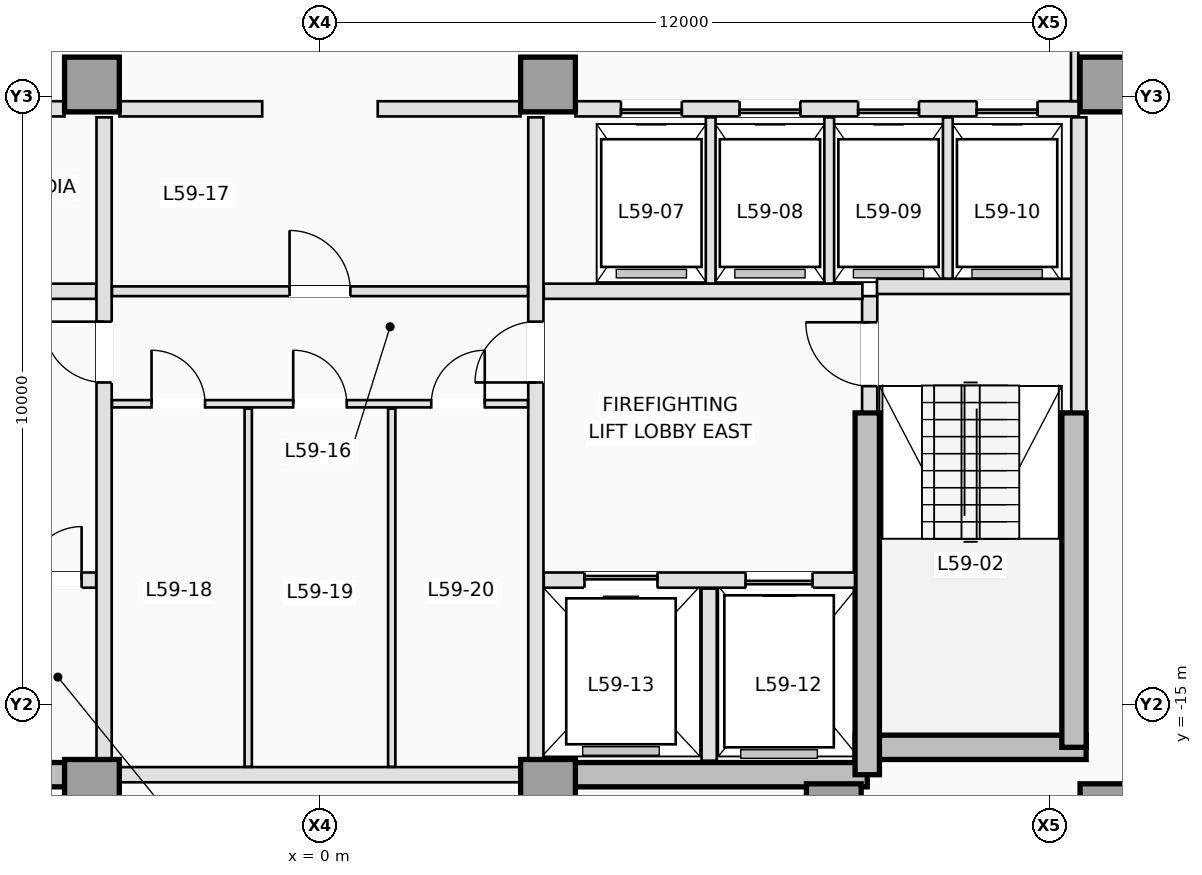
"""IFC4 building model, lengths in metres.
Left out: names, types, materials, properties, quantities, classifications, styles, units other than length and angle.
Written with IfcOpenShell. Run it as: python <this file> out.ifc"""

import sys

from ifc_helpers import new_model, si_unit, direction, frame, frame_2d, origin, origin_2d, place, context, subcontext, project, spatial, rectangle, extrude, element, fill, save


model = new_model("IFC4")
c1 = context("Model", 3, precision=1e-05, world=origin(), true_north=direction((0.0, 1.0)))
c2 = subcontext(c1, "Body", "Model", "MODEL_VIEW")
j1 = project(units=[si_unit("LENGTHUNIT", "METRE"), si_unit("PLANEANGLEUNIT", "RADIAN")], contexts=[c1])
p1 = place(None, origin())
s1 = spatial("IfcSite", under=j1, at=p1, CompositionType="ELEMENT")
p2 = place(p1, origin())
s2 = spatial("IfcBuilding", under=s1, at=p2, CompositionType="ELEMENT")
p3 = place(p2, frame((0.0, 0.0, 214.9)))
s3 = spatial("IfcBuildingStorey", under=s2, at=p3, CompositionType="ELEMENT", Elevation=214.9)
for number, where, z_axis, x_axis in (
    (1, (-9.0, -16.15, 0.0), (0.0, 0.0, 1.0), (1.0, 0.0, 0.0)),
    (2, (3.75, -16.15, 0.0), (0.0, 0.0, 1.0), (1.0, 0.0, 0.0)),
):
    element("IfcWall", number, at=place(p3, frame(where, z_axis=z_axis, x_axis=x_axis)), inside=s3, PredefinedType="SHEAR", context=c2, shape_type="SweptSolid", body=[
        extrude(rectangle(XDim=5.25, YDim=0.4, at=frame_2d((2.625, 0.0))), origin(), (0.0, 0.0, 1.0), 3.5),
    ])
p4 = place(p3, frame((8.8, -15.7, 0.0), z_axis=(0.0, 0.0, 1.0), x_axis=(1.0, 0.0, 0.0)))
e3 = element("IfcWall", 3, at=p4, inside=s3, PredefinedType="SHEAR", context=c2, shape_type="SweptSolid", body=[
    extrude(rectangle(XDim=3.8, YDim=0.4, at=frame_2d((1.9, 0.0))), origin(), (0.0, 0.0, 1.0), 3.5),
])
p5 = place(p3, frame((12.4, -15.7, 0.0), z_axis=(0.0, 0.0, 1.0), x_axis=(0.0, 1.0, 0.0)))
e4 = element("IfcWall", 4, at=p5, inside=s3, PredefinedType="SHEAR", context=c2, shape_type="SweptSolid", body=[
    extrude(rectangle(XDim=5.5, YDim=0.4, at=frame_2d((2.75, 0.0))), origin(), (0.0, 0.0, 1.0), 3.5),
])
p6 = place(p3, frame((9.0, -16.15, 0.0), z_axis=(0.0, 0.0, 1.0), x_axis=(0.0, 1.0, 0.0)))
e5 = element("IfcWall", 5, at=p6, inside=s3, PredefinedType="SHEAR", context=c2, shape_type="SweptSolid", body=[
    extrude(rectangle(XDim=5.95, YDim=0.4, at=frame_2d((2.975, 0.0))), origin(), (0.0, 0.0, 1.0), 3.5),
])
for number, where, z_axis, x_axis in (
    (6, (-3.75, -16.35, 0.0), (0.0, 0.0, 1.0), (1.0, 0.0, 0.0)),
    (7, (3.75, -16.35, 0.0), (0.0, 0.0, 1.0), (1.0, 0.0, 0.0)),
    (8, (8.45, -16.75, 0.0), (0.0, 0.0, 1.0), (1.0, 0.0, 0.0)),
    (9, (12.95, -16.75, 0.0), (0.0, 0.0, 1.0), (1.0, 0.0, 0.0)),
    (10, (-3.75, -4.8, 0.0), (0.0, 0.0, 1.0), (1.0, 0.0, 0.0)),
    (11, (3.75, -4.8, 0.0), (0.0, 0.0, 1.0), (1.0, 0.0, 0.0)),
    (12, (12.95, -4.8, 0.0), (0.0, 0.0, 1.0), (1.0, 0.0, 0.0)),
):
    element("IfcColumn", number, at=place(p3, frame(where, z_axis=z_axis, x_axis=x_axis)), inside=s3, PredefinedType="COLUMN", context=c2, shape_type="SweptSolid", body=[
        extrude(rectangle(XDim=0.9, YDim=0.9, at=origin_2d()), origin(), (0.0, 0.0, 1.0), 3.5),
    ])
p7 = place(p3, frame((9.04, -10.18, 0.0), z_axis=(0.0, 0.0, 1.0), x_axis=(0.0, 1.0, 0.0)))
e13 = element("IfcWall", 13, at=p7, inside=s3, PredefinedType="PARTITIONING", context=c2, shape_type="SweptSolid", body=[
    extrude(rectangle(XDim=1.9, YDim=0.25, at=frame_2d((0.95, 0.0))), origin(), (0.0, 0.0, 1.0), 3.25),
])
p8 = place(p7, frame((0.42, 0.0, 0.0)))
e14 = element("IfcOpeningElement", 14, at=p8, cuts=e13, PredefinedType="OPENING", context=c2, shape_type="SweptSolid", body=[
    extrude(rectangle(XDim=1.05, YDim=2.15, at=frame_2d((0.525, 1.075))), frame((0.0, 0.135, 0.0), z_axis=(0.0, -1.0, 0.0), x_axis=(1.0, 0.0, 0.0)), (0.0, 0.0, 1.0), 0.27),
])
p9 = place(p3, frame((9.16, -8.12, 0.0), z_axis=(0.0, 0.0, 1.0), x_axis=(1.0, 0.0, 0.0)))
e15 = element("IfcWall", 15, at=p9, inside=s3, PredefinedType="PARTITIONING", context=c2, shape_type="SweptSolid", body=[
    extrude(rectangle(XDim=3.22, YDim=0.25, at=frame_2d((1.61, 0.0))), origin(), (0.0, 0.0, 1.0), 3.25),
])
p10 = place(p3, frame((12.48, -10.18, 0.0), z_axis=(0.0, 0.0, 1.0), x_axis=(0.0, 1.0, 0.0)))
e16 = element("IfcWall", 16, at=p10, inside=s3, PredefinedType="PARTITIONING", context=c2, shape_type="SweptSolid", body=[
    extrude(rectangle(XDim=4.84, YDim=0.25, at=frame_2d((2.42, 0.0))), origin(), (0.0, 0.0, 1.0), 3.25),
])
p11 = place(p3, frame((-8.798, -12.95, 0.0), z_axis=(0.0, 0.0, 1.0), x_axis=(1.0, 0.0, 0.0)))
e17 = element("IfcWall", 17, at=p11, inside=s3, PredefinedType="PARTITIONING", context=c2, shape_type="SweptSolid", body=[
    extrude(rectangle(XDim=5.118, YDim=0.25, at=frame_2d((2.559, 0.0))), origin(), (0.0, 0.0, 1.0), 3.25),
])
p12 = place(p11, frame((0.698, 0.0, 0.0)))
e18 = element("IfcOpeningElement", 18, at=p12, cuts=e17, PredefinedType="OPENING", context=c2, shape_type="SweptSolid", body=[
    extrude(rectangle(XDim=1.1, YDim=2.15, at=frame_2d((0.55, 1.075))), frame((0.0, 0.135, 0.0), z_axis=(0.0, -1.0, 0.0), x_axis=(1.0, 0.0, 0.0)), (0.0, 0.0, 1.0), 0.27),
])
p13 = place(p11, frame((2.598, 0.0, 0.0)))
e19 = element("IfcOpeningElement", 19, at=p13, cuts=e17, PredefinedType="OPENING", context=c2, shape_type="SweptSolid", body=[
    extrude(rectangle(XDim=0.88, YDim=2.1, at=frame_2d((0.44, 1.05))), frame((0.0, 0.135, 0.0), z_axis=(0.0, -1.0, 0.0), x_axis=(1.0, 0.0, 0.0)), (0.0, 0.0, 1.0), 0.27),
])
p14 = place(p11, frame((3.998, 0.0, 0.0)))
e20 = element("IfcOpeningElement", 20, at=p14, cuts=e17, PredefinedType="OPENING", context=c2, shape_type="SweptSolid", body=[
    extrude(rectangle(XDim=0.88, YDim=2.1, at=frame_2d((0.44, 1.05))), frame((0.0, 0.135, 0.0), z_axis=(0.0, -1.0, 0.0), x_axis=(1.0, 0.0, 0.0)), (0.0, 0.0, 1.0), 0.27),
])
p15 = place(p3, frame((3.68, -12.95, 0.0), z_axis=(0.0, 0.0, 1.0), x_axis=(1.0, 0.0, 0.0)))
e21 = element("IfcWall", 21, at=p15, inside=s3, PredefinedType="PARTITIONING", context=c2, shape_type="SweptSolid", body=[
    extrude(rectangle(XDim=5.118, YDim=0.25, at=frame_2d((2.559, 0.0))), origin(), (0.0, 0.0, 1.0), 3.25),
])
p16 = place(p15, frame((3.32, 0.0, 0.0)))
e22 = element("IfcOpeningElement", 22, at=p16, cuts=e21, PredefinedType="OPENING", context=c2, shape_type="SweptSolid", body=[
    extrude(rectangle(XDim=1.1, YDim=2.15, at=frame_2d((0.55, 1.075))), frame((0.0, 0.135, 0.0), z_axis=(0.0, -1.0, 0.0), x_axis=(1.0, 0.0, 0.0)), (0.0, 0.0, 1.0), 0.27),
])
p17 = place(p15, frame((0.67, 0.0, 0.0)))
e23 = element("IfcOpeningElement", 23, at=p17, cuts=e21, PredefinedType="OPENING", context=c2, shape_type="SweptSolid", body=[
    extrude(rectangle(XDim=1.2, YDim=2.15, at=frame_2d((0.6, 1.075))), frame((0.0, 0.135, 0.0), z_axis=(0.0, -1.0, 0.0), x_axis=(1.0, 0.0, 0.0)), (0.0, 0.0, 1.0), 0.27),
])
p18 = place(p3, frame((6.4, -15.92, 0.0), z_axis=(0.0, 0.0, 1.0), x_axis=(0.0, 1.0, 0.0)))
e24 = element("IfcWall", 24, at=p18, inside=s3, PredefinedType="PARTITIONING", context=c2, shape_type="SweptSolid", body=[
    extrude(rectangle(XDim=2.83, YDim=0.25, at=frame_2d((1.415, 0.0))), origin(), (0.0, 0.0, 1.0), 3.25),
])
for number, where, z_axis, x_axis in (
    (25, (-8.92, -8.2, 0.0), (0.0, 0.0, 1.0), (1.0, 0.0, 0.0)),
    (26, (3.68, -8.2, 0.0), (0.0, 0.0, 1.0), (1.0, 0.0, 0.0)),
):
    element("IfcWall", number, at=place(p3, frame(where, z_axis=z_axis, x_axis=x_axis)), inside=s3, PredefinedType="PARTITIONING", context=c2, shape_type="SweptSolid", body=[
        extrude(rectangle(XDim=5.24, YDim=0.25, at=frame_2d((2.62, 0.0))), origin(), (0.0, 0.0, 1.0), 3.25),
    ])
p19 = place(p3, frame((-3.55, -15.898, 0.0), z_axis=(0.0, 0.0, 1.0), x_axis=(0.0, 1.0, 0.0)))
e27 = element("IfcWall", 27, at=p19, inside=s3, PredefinedType="PARTITIONING", context=c2, shape_type="SweptSolid", body=[
    extrude(rectangle(XDim=10.558, YDim=0.25, at=frame_2d((5.279, 0.0))), origin(), (0.0, 0.0, 1.0), 3.25),
])
p20 = place(p19, frame((6.198, 0.0, 0.0)))
e28 = element("IfcOpeningElement", 28, at=p20, cuts=e27, PredefinedType="OPENING", context=c2, shape_type="SweptSolid", body=[
    extrude(rectangle(XDim=1.0, YDim=2.15, at=frame_2d((0.5, 1.075))), frame((0.0, 0.135, 0.0), z_axis=(0.0, -1.0, 0.0), x_axis=(1.0, 0.0, 0.0)), (0.0, 0.0, 1.0), 0.27),
])
p21 = place(p3, frame((3.55, -15.898, 0.0), z_axis=(0.0, 0.0, 1.0), x_axis=(0.0, 1.0, 0.0)))
e29 = element("IfcWall", 29, at=p21, inside=s3, PredefinedType="PARTITIONING", context=c2, shape_type="SweptSolid", body=[
    extrude(rectangle(XDim=10.558, YDim=0.25, at=frame_2d((5.279, 0.0))), origin(), (0.0, 0.0, 1.0), 3.25),
])
p22 = place(p21, frame((6.198, 0.0, 0.0)))
e30 = element("IfcOpeningElement", 30, at=p22, cuts=e29, PredefinedType="OPENING", context=c2, shape_type="SweptSolid", body=[
    extrude(rectangle(XDim=1.0, YDim=2.15, at=frame_2d((0.5, 1.075))), frame((0.0, 0.135, 0.0), z_axis=(0.0, -1.0, 0.0), x_axis=(1.0, 0.0, 0.0)), (0.0, 0.0, 1.0), 0.27),
])
p23 = place(p3, frame((-12.48, -5.2, 0.0), z_axis=(0.0, 0.0, 1.0), x_axis=(1.0, 0.0, 0.0)))
e31 = element("IfcWall", 31, at=p23, inside=s3, PredefinedType="PARTITIONING", context=c2, shape_type="SweptSolid", body=[
    extrude(rectangle(XDim=8.278, YDim=0.25, at=frame_2d((4.139, 0.0))), origin(), (0.0, 0.0, 1.0), 3.25),
])
p24 = place(p23, frame((3.05, 0.0, 0.0)))
e32 = element("IfcOpeningElement", 32, at=p24, cuts=e31, PredefinedType="OPENING", context=c2, shape_type="SweptSolid", body=[
    extrude(rectangle(XDim=0.92, YDim=2.12, at=frame_2d((0.46, 1.06))), frame((0.0, 0.135, 0.0), z_axis=(0.0, -1.0, 0.0), x_axis=(1.0, 0.0, 0.0)), (0.0, 0.0, 1.0), 0.27),
])
p25 = place(p23, frame((6.15, 0.0, 0.0)))
e33 = element("IfcOpeningElement", 33, at=p25, cuts=e31, PredefinedType="OPENING", context=c2, shape_type="SweptSolid", body=[
    extrude(rectangle(XDim=0.92, YDim=2.12, at=frame_2d((0.46, 1.06))), frame((0.0, 0.135, 0.0), z_axis=(0.0, -1.0, 0.0), x_axis=(1.0, 0.0, 0.0)), (0.0, 0.0, 1.0), 0.27),
])
p26 = place(p3, frame((4.202, -5.2, 0.0), z_axis=(0.0, 0.0, 1.0), x_axis=(1.0, 0.0, 0.0)))
e34 = element("IfcWall", 34, at=p26, inside=s3, PredefinedType="PARTITIONING", context=c2, shape_type="SweptSolid", body=[
    extrude(rectangle(XDim=8.278, YDim=0.25, at=frame_2d((4.139, 0.0))), origin(), (0.0, 0.0, 1.0), 3.25),
])
p27 = place(p26, frame((0.748, 0.0, 0.0)))
e35 = element("IfcOpeningElement", 35, at=p27, cuts=e34, PredefinedType="OPENING", context=c2, shape_type="SweptSolid", body=[
    extrude(rectangle(XDim=1.0, YDim=2.15, at=frame_2d((0.5, 1.075))), frame((0.0, 0.135, 0.0), z_axis=(0.0, -1.0, 0.0), x_axis=(1.0, 0.0, 0.0)), (0.0, 0.0, 1.0), 0.27),
])
p28 = place(p26, frame((2.698, 0.0, 0.0)))
e36 = element("IfcOpeningElement", 36, at=p28, cuts=e34, PredefinedType="OPENING", context=c2, shape_type="SweptSolid", body=[
    extrude(rectangle(XDim=1.0, YDim=2.15, at=frame_2d((0.5, 1.075))), frame((0.0, 0.135, 0.0), z_axis=(0.0, -1.0, 0.0), x_axis=(1.0, 0.0, 0.0)), (0.0, 0.0, 1.0), 0.27),
])
p29 = place(p26, frame((4.648, 0.0, 0.0)))
e37 = element("IfcOpeningElement", 37, at=p29, cuts=e34, PredefinedType="OPENING", context=c2, shape_type="SweptSolid", body=[
    extrude(rectangle(XDim=1.0, YDim=2.15, at=frame_2d((0.5, 1.075))), frame((0.0, 0.135, 0.0), z_axis=(0.0, -1.0, 0.0), x_axis=(1.0, 0.0, 0.0)), (0.0, 0.0, 1.0), 0.27),
])
p30 = place(p26, frame((6.598, 0.0, 0.0)))
e38 = element("IfcOpeningElement", 38, at=p30, cuts=e34, PredefinedType="OPENING", context=c2, shape_type="SweptSolid", body=[
    extrude(rectangle(XDim=1.0, YDim=2.15, at=frame_2d((0.5, 1.075))), frame((0.0, 0.135, 0.0), z_axis=(0.0, -1.0, 0.0), x_axis=(1.0, 0.0, 0.0)), (0.0, 0.0, 1.0), 0.27),
])
for number, where, z_axis, x_axis in (
    (39, (-3.298, -5.2, 0.0), (0.0, 0.0, 1.0), (1.0, 0.0, 0.0)),
    (40, (0.95, -5.2, 0.0), (0.0, 0.0, 1.0), (1.0, 0.0, 0.0)),
):
    element("IfcWall", number, at=place(p3, frame(where, z_axis=z_axis, x_axis=x_axis)), inside=s3, PredefinedType="PARTITIONING", context=c2, shape_type="SweptSolid", body=[
        extrude(rectangle(XDim=2.348, YDim=0.25, at=frame_2d((1.174, 0.0))), origin(), (0.0, 0.0, 1.0), 3.25),
    ])
for number, where, z_axis, x_axis in (
    (41, (6.425, -8.073, 0.0), (0.0, 0.0, 1.0), (0.0, 1.0, 0.0)),
    (42, (8.375, -8.073, 0.0), (0.0, 0.0, 1.0), (0.0, 1.0, 0.0)),
):
    element("IfcWall", number, at=place(p3, frame(where, z_axis=z_axis, x_axis=x_axis)), inside=s3, PredefinedType="PARTITIONING", context=c2, shape_type="SweptSolid", body=[
        extrude(rectangle(XDim=2.733, YDim=0.16, at=frame_2d((1.366, 0.0))), origin(), (0.0, 0.0, 1.0), 3.25),
    ])
p31 = place(p3, frame((10.325, -7.993, 0.0), z_axis=(0.0, 0.0, 1.0), x_axis=(0.0, 1.0, 0.0)))
e43 = element("IfcWall", 43, at=p31, inside=s3, PredefinedType="PARTITIONING", context=c2, shape_type="SweptSolid", body=[
    extrude(rectangle(XDim=2.653, YDim=0.16, at=frame_2d((1.326, 0.0))), origin(), (0.0, 0.0, 1.0), 3.25),
])
p32 = place(p3, frame((-3.298, -16.15, 0.0), z_axis=(0.0, 0.0, 1.0), x_axis=(1.0, 0.0, 0.0)))
e44 = element("IfcWall", 44, at=p32, inside=s3, PredefinedType="PARTITIONING", context=c2, shape_type="SweptSolid", body=[
    extrude(rectangle(XDim=6.596, YDim=0.25, at=frame_2d((3.298, 0.0))), origin(), (0.0, 0.0, 1.0), 2.45),
])
p33 = place(p3, frame((-3.42, -8.2, 0.0), z_axis=(0.0, 0.0, 1.0), x_axis=(1.0, 0.0, 0.0)))
e45 = element("IfcWall", 45, at=p33, inside=s3, PredefinedType="PARTITIONING", context=c2, shape_type="SweptSolid", body=[
    extrude(rectangle(XDim=6.84, YDim=0.16, at=frame_2d((3.42, 0.0))), origin(), (0.0, 0.0, 1.0), 3.25),
])
p34 = place(p33, frame((2.92, 0.0, 0.0)))
e46 = element("IfcOpeningElement", 46, at=p34, cuts=e45, PredefinedType="OPENING", context=c2, shape_type="SweptSolid", body=[
    extrude(rectangle(XDim=1.0, YDim=2.15, at=frame_2d((0.5, 1.075))), frame((0.0, 0.09, 0.0), z_axis=(0.0, -1.0, 0.0), x_axis=(1.0, 0.0, 0.0)), (0.0, 0.0, 1.0), 0.18),
])
p35 = place(p3, frame((-3.42, -10.05, 0.0), z_axis=(0.0, 0.0, 1.0), x_axis=(1.0, 0.0, 0.0)))
e47 = element("IfcWall", 47, at=p35, inside=s3, PredefinedType="PARTITIONING", context=c2, shape_type="SweptSolid", body=[
    extrude(rectangle(XDim=6.84, YDim=0.12, at=frame_2d((3.42, 0.0))), origin(), (0.0, 0.0, 1.0), 3.25),
])
p36 = place(p35, frame((0.65, 0.0, 0.0)))
e48 = element("IfcOpeningElement", 48, at=p36, cuts=e47, PredefinedType="OPENING", context=c2, shape_type="SweptSolid", body=[
    extrude(rectangle(XDim=0.88, YDim=2.12, at=frame_2d((0.44, 1.06))), frame((0.0, 0.07, 0.0), z_axis=(0.0, -1.0, 0.0), x_axis=(1.0, 0.0, 0.0)), (0.0, 0.0, 1.0), 0.14),
])
p37 = place(p35, frame((2.98, 0.0, 0.0)))
e49 = element("IfcOpeningElement", 49, at=p37, cuts=e47, PredefinedType="OPENING", context=c2, shape_type="SweptSolid", body=[
    extrude(rectangle(XDim=0.88, YDim=2.12, at=frame_2d((0.44, 1.06))), frame((0.0, 0.07, 0.0), z_axis=(0.0, -1.0, 0.0), x_axis=(1.0, 0.0, 0.0)), (0.0, 0.0, 1.0), 0.14),
])
p38 = place(p35, frame((5.25, 0.0, 0.0)))
e50 = element("IfcOpeningElement", 50, at=p38, cuts=e47, PredefinedType="OPENING", context=c2, shape_type="SweptSolid", body=[
    extrude(rectangle(XDim=0.88, YDim=2.12, at=frame_2d((0.44, 1.06))), frame((0.0, 0.07, 0.0), z_axis=(0.0, -1.0, 0.0), x_axis=(1.0, 0.0, 0.0)), (0.0, 0.0, 1.0), 0.14),
])
for number, where, z_axis, x_axis in (
    (51, (-1.18, -16.02, 0.0), (0.0, 0.0, 1.0), (0.0, 1.0, 0.0)),
    (52, (1.18, -16.02, 0.0), (0.0, 0.0, 1.0), (0.0, 1.0, 0.0)),
):
    element("IfcWall", number, at=place(p3, frame(where, z_axis=z_axis, x_axis=x_axis)), inside=s3, PredefinedType="PARTITIONING", context=c2, shape_type="SweptSolid", body=[
        extrude(rectangle(XDim=5.89, YDim=0.12, at=frame_2d((2.945, 0.0))), origin(), (0.0, 0.0, 1.0), 3.25),
    ])
p39 = place(p3, frame((12.41, -2.462, 0.0), z_axis=(0.0, 0.0, 1.0), x_axis=(0.0, -1.0, 0.0)))
e53 = element("IfcWall", 53, at=p39, inside=s3, PredefinedType="PARTITIONING", context=c2, shape_type="SweptSolid", body=[
    extrude(rectangle(XDim=2.611, YDim=0.12, at=frame_2d((1.306, 0.0))), origin(), (0.0, 0.0, 1.0), 3.25),
])
p40 = place(p27, origin())
e54 = element("IfcDoor", 54, at=p40, inside=s3, OperationType="SLIDING_TO_RIGHT", PredefinedType="DOOR", context=c2, shape_type="SweptSolid", body=[
    extrude(rectangle(XDim=1.0, YDim=2.15, at=frame_2d((0.5, 1.075))), frame((0.0, 0.025, 0.0), z_axis=(0.0, -1.0, 0.0), x_axis=(1.0, 0.0, 0.0)), (0.0, 0.0, 1.0), 0.05),
])
fill(e35, e54)
p41 = place(p28, origin())
e55 = element("IfcDoor", 55, at=p41, inside=s3, OperationType="SLIDING_TO_RIGHT", PredefinedType="DOOR", context=c2, shape_type="SweptSolid", body=[
    extrude(rectangle(XDim=1.0, YDim=2.15, at=frame_2d((0.5, 1.075))), frame((0.0, 0.025, 0.0), z_axis=(0.0, -1.0, 0.0), x_axis=(1.0, 0.0, 0.0)), (0.0, 0.0, 1.0), 0.05),
])
fill(e36, e55)
p42 = place(p29, origin())
e56 = element("IfcDoor", 56, at=p42, inside=s3, OperationType="SLIDING_TO_RIGHT", PredefinedType="DOOR", context=c2, shape_type="SweptSolid", body=[
    extrude(rectangle(XDim=1.0, YDim=2.15, at=frame_2d((0.5, 1.075))), frame((0.0, 0.025, 0.0), z_axis=(0.0, -1.0, 0.0), x_axis=(1.0, 0.0, 0.0)), (0.0, 0.0, 1.0), 0.05),
])
fill(e37, e56)
p43 = place(p30, origin())
e57 = element("IfcDoor", 57, at=p43, inside=s3, OperationType="SLIDING_TO_RIGHT", PredefinedType="DOOR", context=c2, shape_type="SweptSolid", body=[
    extrude(rectangle(XDim=1.0, YDim=2.15, at=frame_2d((0.5, 1.075))), frame((0.0, 0.025, 0.0), z_axis=(0.0, -1.0, 0.0), x_axis=(1.0, 0.0, 0.0)), (0.0, 0.0, 1.0), 0.05),
])
fill(e38, e57)
p44 = place(p16, origin())
e58 = element("IfcDoor", 58, at=p44, inside=s3, OperationType="SLIDING_TO_RIGHT", PredefinedType="DOOR", context=c2, shape_type="SweptSolid", body=[
    extrude(rectangle(XDim=1.1, YDim=2.15, at=frame_2d((0.55, 1.075))), frame((0.0, 0.025, 0.0), z_axis=(0.0, -1.0, 0.0), x_axis=(1.0, 0.0, 0.0)), (0.0, 0.0, 1.0), 0.05),
])
fill(e22, e58)
p45 = place(p17, origin())
e59 = element("IfcDoor", 59, at=p45, inside=s3, OperationType="SLIDING_TO_LEFT", PredefinedType="DOOR", context=c2, shape_type="SweptSolid", body=[
    extrude(rectangle(XDim=1.2, YDim=2.15, at=frame_2d((0.6, 1.075))), frame((0.0, 0.025, 0.0), z_axis=(0.0, -1.0, 0.0), x_axis=(1.0, 0.0, 0.0)), (0.0, 0.0, 1.0), 0.05),
])
fill(e23, e59)
p46 = place(p8, origin())
e60 = element("IfcDoor", 60, at=p46, inside=s3, OperationType="SINGLE_SWING_RIGHT", PredefinedType="DOOR", context=c2, shape_type="SweptSolid", body=[
    extrude(rectangle(XDim=1.05, YDim=2.15, at=frame_2d((0.525, 1.075))), frame((0.0, 0.025, 0.0), z_axis=(0.0, -1.0, 0.0), x_axis=(1.0, 0.0, 0.0)), (0.0, 0.0, 1.0), 0.05),
])
fill(e14, e60)
p47 = place(p14, origin())
e61 = element("IfcDoor", 61, at=p47, inside=s3, OperationType="SINGLE_SWING_RIGHT", PredefinedType="TRAPDOOR", context=c2, shape_type="SweptSolid", body=[
    extrude(rectangle(XDim=0.88, YDim=2.1, at=frame_2d((0.44, 1.05))), frame((0.0, 0.025, 0.0), z_axis=(0.0, -1.0, 0.0), x_axis=(1.0, 0.0, 0.0)), (0.0, 0.0, 1.0), 0.05),
])
fill(e20, e61)
p48 = place(p20, origin())
e62 = element("IfcDoor", 62, at=p48, inside=s3, OperationType="SINGLE_SWING_RIGHT", PredefinedType="DOOR", context=c2, shape_type="SweptSolid", body=[
    extrude(rectangle(XDim=1.0, YDim=2.15, at=frame_2d((0.5, 1.075))), frame((0.0, 0.025, 0.0), z_axis=(0.0, -1.0, 0.0), x_axis=(1.0, 0.0, 0.0)), (0.0, 0.0, 1.0), 0.05),
])
fill(e28, e62)
p49 = place(p22, origin())
e63 = element("IfcDoor", 63, at=p49, inside=s3, OperationType="SINGLE_SWING_LEFT", PredefinedType="DOOR", context=c2, shape_type="SweptSolid", body=[
    extrude(rectangle(XDim=1.0, YDim=2.15, at=frame_2d((0.5, 1.075))), frame((0.0, 0.025, 0.0), z_axis=(0.0, -1.0, 0.0), x_axis=(1.0, 0.0, 0.0)), (0.0, 0.0, 1.0), 0.05),
])
fill(e30, e63)
p50 = place(p34, origin())
e64 = element("IfcDoor", 64, at=p50, inside=s3, OperationType="SINGLE_SWING_LEFT", PredefinedType="DOOR", context=c2, shape_type="SweptSolid", body=[
    extrude(rectangle(XDim=1.0, YDim=2.15, at=frame_2d((0.5, 1.075))), frame((0.0, 0.025, 0.0), z_axis=(0.0, -1.0, 0.0), x_axis=(1.0, 0.0, 0.0)), (0.0, 0.0, 1.0), 0.05),
])
fill(e46, e64)
p51 = place(p36, origin())
e65 = element("IfcDoor", 65, at=p51, inside=s3, OperationType="SINGLE_SWING_LEFT", PredefinedType="DOOR", context=c2, shape_type="SweptSolid", body=[
    extrude(rectangle(XDim=0.88, YDim=2.12, at=frame_2d((0.44, 1.06))), frame((0.0, 0.025, 0.0), z_axis=(0.0, -1.0, 0.0), x_axis=(1.0, 0.0, 0.0)), (0.0, 0.0, 1.0), 0.05),
])
fill(e48, e65)
p52 = place(p37, origin())
e66 = element("IfcDoor", 66, at=p52, inside=s3, OperationType="SINGLE_SWING_LEFT", PredefinedType="DOOR", context=c2, shape_type="SweptSolid", body=[
    extrude(rectangle(XDim=0.88, YDim=2.12, at=frame_2d((0.44, 1.06))), frame((0.0, 0.025, 0.0), z_axis=(0.0, -1.0, 0.0), x_axis=(1.0, 0.0, 0.0)), (0.0, 0.0, 1.0), 0.05),
])
fill(e49, e66)
p53 = place(p38, origin())
e67 = element("IfcDoor", 67, at=p53, inside=s3, OperationType="SINGLE_SWING_RIGHT", PredefinedType="DOOR", context=c2, shape_type="SweptSolid", body=[
    extrude(rectangle(XDim=0.88, YDim=2.12, at=frame_2d((0.44, 1.06))), frame((0.0, 0.025, 0.0), z_axis=(0.0, -1.0, 0.0), x_axis=(1.0, 0.0, 0.0)), (0.0, 0.0, 1.0), 0.05),
])
fill(e50, e67)
save(model, sys.argv[1])
